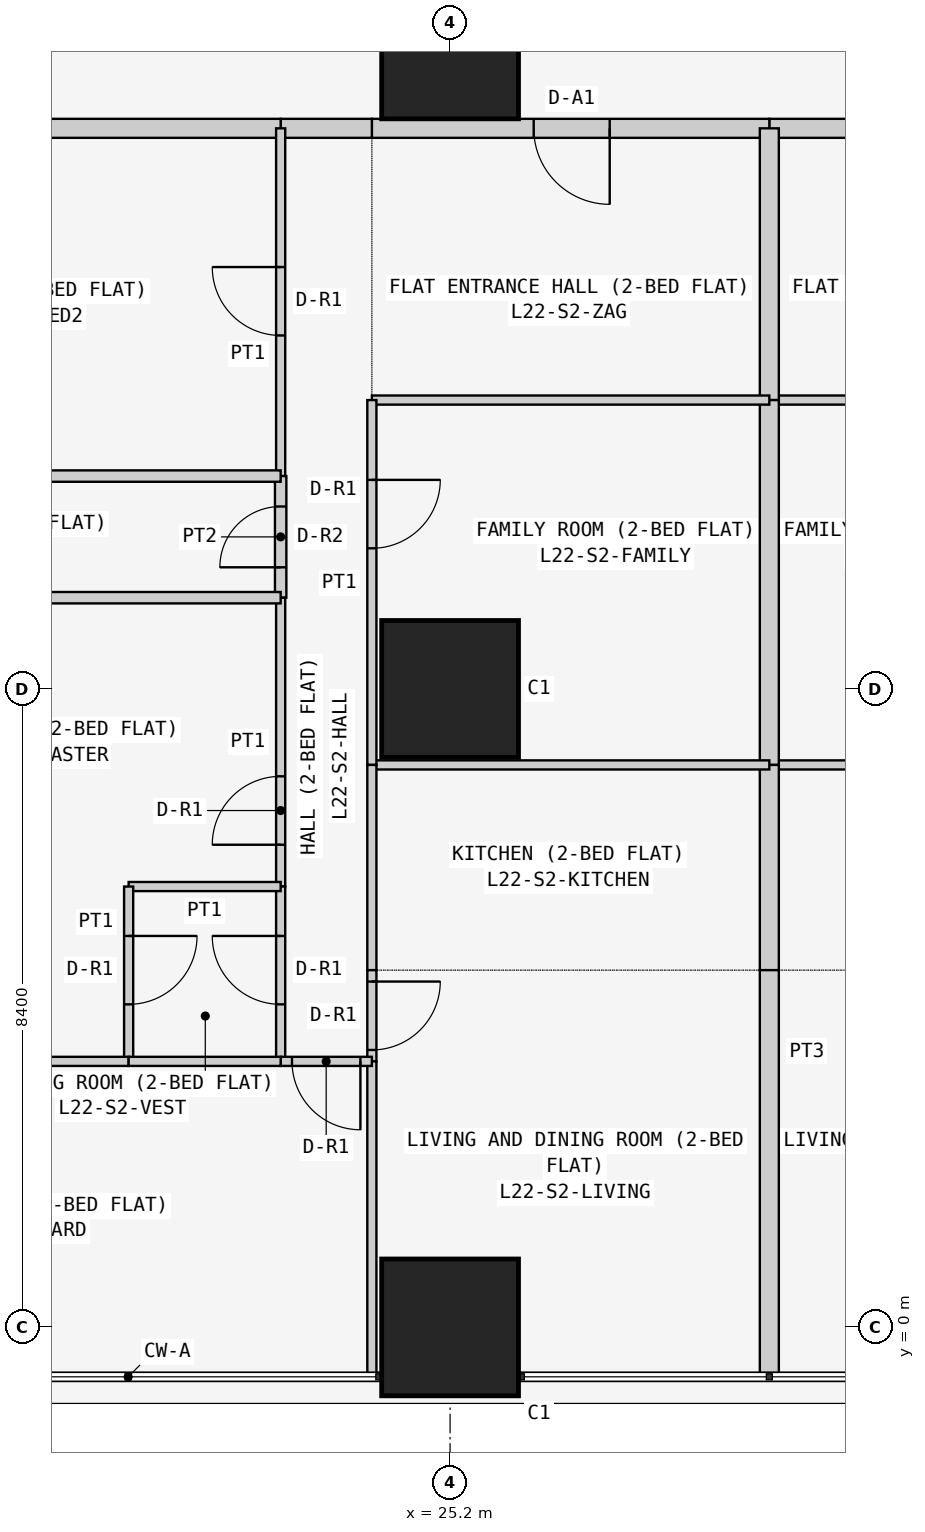
"""IFC4 building model, lengths in metres.
Left out: names, types, materials, properties, quantities, classifications, styles, units other than length and angle.
Written with IfcOpenShell. Run it as: python <this file> out.ifc"""

import sys

from ifc_helpers import new_model, si_unit, direction, frame, frame_2d, origin, origin_2d, place, context, subcontext, project, spatial, rectangle, extrude, element, fill, save


model = new_model("IFC4")
c1 = context("Model", 3, precision=1e-05, world=origin(), true_north=direction((0.0, 1.0)))
c2 = subcontext(c1, "Body", "Model", "MODEL_VIEW")
j1 = project(units=[si_unit("LENGTHUNIT", "METRE"), si_unit("PLANEANGLEUNIT", "RADIAN")], contexts=[c1])
p1 = place(None, origin())
s1 = spatial("IfcSite", under=j1, at=p1, CompositionType="ELEMENT")
p2 = place(p1, origin())
s2 = spatial("IfcBuilding", under=s1, at=p2, CompositionType="ELEMENT")
p3 = place(p2, frame((0.0, 0.0, 88.5)))
s3 = spatial("IfcBuildingStorey", under=s2, at=p3, CompositionType="ELEMENT", Elevation=88.5)
for number, where, z_axis, x_axis in (
    (1, (25.2, 0.0, 0.0), (0.0, 0.0, 1.0), (1.0, 0.0, 0.0)),
    (2, (25.2, 8.4, 0.0), (0.0, 0.0, 1.0), (1.0, 0.0, 0.0)),
    (3, (25.2, 16.8, 0.0), (0.0, 0.0, 1.0), (1.0, 0.0, 0.0)),
):
    element("IfcColumn", number, at=place(p3, frame(where, z_axis=z_axis, x_axis=x_axis)), inside=s3, PredefinedType="COLUMN", context=c2, shape_type="SweptSolid", body=[
        extrude(rectangle(XDim=1.8, YDim=1.8, at=origin_2d()), origin(), (0.0, 0.0, 1.0), 3.6),
    ])
p4 = place(p3, frame((34.629, 15.775, 0.0), z_axis=(0.0, 0.0, 1.0), x_axis=(-1.0, 0.0, 0.0)))
e4 = element("IfcWall", 4, at=p4, inside=s3, PredefinedType="PARTITIONING", context=c2, shape_type="SweptSolid", body=[
    extrude(rectangle(XDim=5.229, YDim=0.25, at=frame_2d((2.615, 0.0))), origin(), (0.0, 0.0, 1.0), 3.45),
])
p5 = place(p4, frame((2.129, 0.0, 0.0)))
e5 = element("IfcOpeningElement", 5, at=p5, cuts=e4, PredefinedType="OPENING", context=c2, shape_type="SweptSolid", body=[
    extrude(rectangle(XDim=1.0, YDim=2.1, at=frame_2d((0.5, 1.05))), frame((0.0, 0.135, 0.0), z_axis=(0.0, -1.0, 0.0), x_axis=(1.0, 0.0, 0.0)), (0.0, 0.0, 1.0), 0.27),
])
p6 = place(p3, frame((29.4, 15.775, 0.0), z_axis=(0.0, 0.0, 1.0), x_axis=(-1.0, 0.0, 0.0)))
e6 = element("IfcWall", 6, at=p6, inside=s3, PredefinedType="PARTITIONING", context=c2, shape_type="SweptSolid", body=[
    extrude(rectangle(XDim=5.229, YDim=0.25, at=frame_2d((2.615, 0.0))), origin(), (0.0, 0.0, 1.0), 3.45),
])
p7 = place(p6, frame((2.1, 0.0, 0.0)))
e7 = element("IfcOpeningElement", 7, at=p7, cuts=e6, PredefinedType="OPENING", context=c2, shape_type="SweptSolid", body=[
    extrude(rectangle(XDim=1.0, YDim=2.1, at=frame_2d((0.5, 1.05))), frame((0.0, 0.135, 0.0), z_axis=(0.0, -1.0, 0.0), x_axis=(1.0, 0.0, 0.0)), (0.0, 0.0, 1.0), 0.27),
])
p8 = place(p3, frame((24.171, 15.775, 0.0), z_axis=(0.0, 0.0, 1.0), x_axis=(-1.0, 0.0, 0.0)))
e8 = element("IfcWall", 8, at=p8, inside=s3, PredefinedType="PARTITIONING", context=c2, shape_type="SweptSolid", body=[
    extrude(rectangle(XDim=1.2, YDim=0.25, at=frame_2d((0.6, 0.0))), origin(), (0.0, 0.0, 1.0), 3.45),
])
p9 = place(p3, frame((22.971, 15.775, 0.0), z_axis=(0.0, 0.0, 1.0), x_axis=(-1.0, 0.0, 0.0)))
e9 = element("IfcWall", 9, at=p9, inside=s3, PredefinedType="PARTITIONING", context=c2, shape_type="SweptSolid", body=[
    extrude(rectangle(XDim=6.871, YDim=0.25, at=frame_2d((3.436, 0.0))), origin(), (0.0, 0.0, 1.0), 3.45),
])
p10 = place(p3, frame((29.4, 12.2, 0.0), z_axis=(0.0, 0.0, 1.0), x_axis=(1.0, 0.0, 0.0)))
e10 = element("IfcWall", 10, at=p10, inside=s3, PredefinedType="PARTITIONING", context=c2, shape_type="SweptSolid", body=[
    extrude(rectangle(XDim=5.229, YDim=0.12, at=frame_2d((2.615, 0.0))), origin(), (0.0, 0.0, 1.0), 3.45),
])
p11 = place(p3, frame((29.4, 15.775, 0.0), z_axis=(0.0, 0.0, 1.0), x_axis=(0.0, -1.0, 0.0)))
e11 = element("IfcWall", 11, at=p11, inside=s3, PredefinedType="PARTITIONING", context=c2, shape_type="SweptSolid", body=[
    extrude(rectangle(XDim=3.575, YDim=0.25, at=frame_2d((1.788, 0.0))), origin(), (0.0, 0.0, 1.0), 2.848),
])
p12 = place(p3, frame((29.4, 7.4, 0.0), z_axis=(0.0, 0.0, 1.0), x_axis=(1.0, 0.0, 0.0)))
e12 = element("IfcWall", 12, at=p12, inside=s3, PredefinedType="PARTITIONING", context=c2, shape_type="SweptSolid", body=[
    extrude(rectangle(XDim=5.229, YDim=0.12, at=frame_2d((2.615, 0.0))), origin(), (0.0, 0.0, 1.0), 3.45),
])
p13 = place(p3, frame((29.4, 12.2, 0.0), z_axis=(0.0, 0.0, 1.0), x_axis=(0.0, -1.0, 0.0)))
e13 = element("IfcWall", 13, at=p13, inside=s3, PredefinedType="PARTITIONING", context=c2, shape_type="SweptSolid", body=[
    extrude(rectangle(XDim=4.8, YDim=0.25, at=frame_2d((2.4, 0.0))), origin(), (0.0, 0.0, 1.0), 2.848),
])
p14 = place(p3, frame((29.4, 7.4, 0.0), z_axis=(0.0, 0.0, 1.0), x_axis=(0.0, -1.0, 0.0)))
e14 = element("IfcWall", 14, at=p14, inside=s3, PredefinedType="PARTITIONING", context=c2, shape_type="SweptSolid", body=[
    extrude(rectangle(XDim=2.7, YDim=0.25, at=frame_2d((1.35, 0.0))), origin(), (0.0, 0.0, 1.0), 2.848),
])
p15 = place(p3, frame((29.4, 4.7, 0.0), z_axis=(0.0, 0.0, 1.0), x_axis=(0.0, -1.0, 0.0)))
e15 = element("IfcWall", 15, at=p15, inside=s3, PredefinedType="PARTITIONING", context=c2, shape_type="SweptSolid", body=[
    extrude(rectangle(XDim=5.35, YDim=0.25, at=frame_2d((2.675, 0.0))), origin(), (0.0, 0.0, 1.0), 2.848),
])
for number, where, z_axis, x_axis in (
    (16, (29.4, 12.2, 0.0), (0.0, 0.0, 1.0), (-1.0, 0.0, 0.0)),
    (17, (29.4, 7.4, 0.0), (0.0, 0.0, 1.0), (-1.0, 0.0, 0.0)),
):
    element("IfcWall", number, at=place(p3, frame(where, z_axis=z_axis, x_axis=x_axis)), inside=s3, PredefinedType="PARTITIONING", context=c2, shape_type="SweptSolid", body=[
        extrude(rectangle(XDim=5.229, YDim=0.12, at=frame_2d((2.615, 0.0))), origin(), (0.0, 0.0, 1.0), 3.45),
    ])
p16 = place(p3, frame((24.171, 7.4, 0.0), z_axis=(0.0, 0.0, 1.0), x_axis=(0.0, 1.0, 0.0)))
e18 = element("IfcWall", 18, at=p16, inside=s3, PredefinedType="PARTITIONING", context=c2, shape_type="SweptSolid", body=[
    extrude(rectangle(XDim=4.8, YDim=0.12, at=frame_2d((2.4, 0.0))), origin(), (0.0, 0.0, 1.0), 3.45),
])
p17 = place(p16, frame((2.85, 0.0, 0.0)))
e19 = element("IfcOpeningElement", 19, at=p17, cuts=e18, PredefinedType="OPENING", context=c2, shape_type="SweptSolid", body=[
    extrude(rectangle(XDim=0.9, YDim=2.1, at=frame_2d((0.45, 1.05))), frame((0.0, 0.07, 0.0), z_axis=(0.0, -1.0, 0.0), x_axis=(1.0, 0.0, 0.0)), (0.0, 0.0, 1.0), 0.14),
])
p18 = place(p3, frame((24.171, 4.7, 0.0), z_axis=(0.0, 0.0, 1.0), x_axis=(0.0, 1.0, 0.0)))
e20 = element("IfcWall", 20, at=p18, inside=s3, PredefinedType="PARTITIONING", context=c2, shape_type="SweptSolid", body=[
    extrude(rectangle(XDim=2.7, YDim=0.12, at=frame_2d((1.35, 0.0))), origin(), (0.0, 0.0, 1.0), 3.45),
])
p19 = place(p3, frame((24.171, 3.5, 0.0), z_axis=(0.0, 0.0, 1.0), x_axis=(0.0, 1.0, 0.0)))
e21 = element("IfcWall", 21, at=p19, inside=s3, PredefinedType="PARTITIONING", context=c2, shape_type="SweptSolid", body=[
    extrude(rectangle(XDim=1.2, YDim=0.12, at=frame_2d((0.6, 0.0))), origin(), (0.0, 0.0, 1.0), 3.45),
])
p20 = place(p19, frame((0.15, 0.0, 0.0)))
e22 = element("IfcOpeningElement", 22, at=p20, cuts=e21, PredefinedType="OPENING", context=c2, shape_type="SweptSolid", body=[
    extrude(rectangle(XDim=0.9, YDim=2.1, at=frame_2d((0.45, 1.05))), frame((0.0, 0.07, 0.0), z_axis=(0.0, -1.0, 0.0), x_axis=(1.0, 0.0, 0.0)), (0.0, 0.0, 1.0), 0.14),
])
p21 = place(p3, frame((24.171, -0.65, 0.0), z_axis=(0.0, 0.0, 1.0), x_axis=(0.0, 1.0, 0.0)))
e23 = element("IfcWall", 23, at=p21, inside=s3, PredefinedType="PARTITIONING", context=c2, shape_type="SweptSolid", body=[
    extrude(rectangle(XDim=4.15, YDim=0.12, at=frame_2d((2.075, 0.0))), origin(), (0.0, 0.0, 1.0), 3.45),
])
p22 = place(p3, frame((22.971, 11.2, 0.0), z_axis=(0.0, 0.0, 1.0), x_axis=(0.0, 1.0, 0.0)))
e24 = element("IfcWall", 24, at=p22, inside=s3, PredefinedType="PARTITIONING", context=c2, shape_type="SweptSolid", body=[
    extrude(rectangle(XDim=4.575, YDim=0.12, at=frame_2d((2.288, 0.0))), origin(), (0.0, 0.0, 1.0), 3.45),
])
p23 = place(p22, frame((1.85, 0.0, 0.0)))
e25 = element("IfcOpeningElement", 25, at=p23, cuts=e24, PredefinedType="OPENING", context=c2, shape_type="SweptSolid", body=[
    extrude(rectangle(XDim=0.9, YDim=2.1, at=frame_2d((0.45, 1.05))), frame((0.0, 0.07, 0.0), z_axis=(0.0, -1.0, 0.0), x_axis=(1.0, 0.0, 0.0)), (0.0, 0.0, 1.0), 0.14),
])
p24 = place(p3, frame((22.971, 9.6, 0.0), z_axis=(0.0, 0.0, 1.0), x_axis=(0.0, 1.0, 0.0)))
e26 = element("IfcWall", 26, at=p24, inside=s3, PredefinedType="PARTITIONING", context=c2, shape_type="SweptSolid", body=[
    extrude(rectangle(XDim=1.6, YDim=0.15, at=frame_2d((0.8, 0.0))), origin(), (0.0, 0.0, 1.0), 3.45),
])
p25 = place(p24, frame((0.4, 0.0, 0.0)))
e27 = element("IfcOpeningElement", 27, at=p25, cuts=e26, PredefinedType="OPENING", context=c2, shape_type="SweptSolid", body=[
    extrude(rectangle(XDim=0.8, YDim=2.1, at=frame_2d((0.4, 1.05))), frame((0.0, 0.085, 0.0), z_axis=(0.0, -1.0, 0.0), x_axis=(1.0, 0.0, 0.0)), (0.0, 0.0, 1.0), 0.17),
])
p26 = place(p3, frame((22.971, 5.8, 0.0), z_axis=(0.0, 0.0, 1.0), x_axis=(0.0, 1.0, 0.0)))
e28 = element("IfcWall", 28, at=p26, inside=s3, PredefinedType="PARTITIONING", context=c2, shape_type="SweptSolid", body=[
    extrude(rectangle(XDim=3.8, YDim=0.12, at=frame_2d((1.9, 0.0))), origin(), (0.0, 0.0, 1.0), 3.45),
])
p27 = place(p26, frame((0.55, 0.0, 0.0)))
e29 = element("IfcOpeningElement", 29, at=p27, cuts=e28, PredefinedType="OPENING", context=c2, shape_type="SweptSolid", body=[
    extrude(rectangle(XDim=0.9, YDim=2.1, at=frame_2d((0.45, 1.05))), frame((0.0, 0.07, 0.0), z_axis=(0.0, -1.0, 0.0), x_axis=(1.0, 0.0, 0.0)), (0.0, 0.0, 1.0), 0.14),
])
p28 = place(p3, frame((22.971, 3.5, 0.0), z_axis=(0.0, 0.0, 1.0), x_axis=(0.0, 1.0, 0.0)))
e30 = element("IfcWall", 30, at=p28, inside=s3, PredefinedType="PARTITIONING", context=c2, shape_type="SweptSolid", body=[
    extrude(rectangle(XDim=2.3, YDim=0.12, at=frame_2d((1.15, 0.0))), origin(), (0.0, 0.0, 1.0), 3.45),
])
p29 = place(p28, frame((0.75, 0.0, 0.0)))
e31 = element("IfcOpeningElement", 31, at=p29, cuts=e30, PredefinedType="OPENING", context=c2, shape_type="SweptSolid", body=[
    extrude(rectangle(XDim=0.9, YDim=2.1, at=frame_2d((0.45, 1.05))), frame((0.0, 0.07, 0.0), z_axis=(0.0, -1.0, 0.0), x_axis=(1.0, 0.0, 0.0)), (0.0, 0.0, 1.0), 0.14),
])
p30 = place(p3, frame((24.171, 3.5, 0.0), z_axis=(0.0, 0.0, 1.0), x_axis=(-1.0, 0.0, 0.0)))
e32 = element("IfcWall", 32, at=p30, inside=s3, PredefinedType="PARTITIONING", context=c2, shape_type="SweptSolid", body=[
    extrude(rectangle(XDim=1.2, YDim=0.12, at=frame_2d((0.6, 0.0))), origin(), (0.0, 0.0, 1.0), 3.45),
])
p31 = place(p30, frame((0.151, 0.0, 0.0)))
e33 = element("IfcOpeningElement", 33, at=p31, cuts=e32, PredefinedType="OPENING", context=c2, shape_type="SweptSolid", body=[
    extrude(rectangle(XDim=0.9, YDim=2.1, at=frame_2d((0.45, 1.05))), frame((0.0, 0.07, 0.0), z_axis=(0.0, -1.0, 0.0), x_axis=(1.0, 0.0, 0.0)), (0.0, 0.0, 1.0), 0.14),
])
for number, where, z_axis, x_axis in (
    (34, (22.971, 11.2, 0.0), (0.0, 0.0, 1.0), (-1.0, 0.0, 0.0)),
    (35, (22.971, 9.6, 0.0), (0.0, 0.0, 1.0), (-1.0, 0.0, 0.0)),
):
    element("IfcWall", number, at=place(p3, frame(where, z_axis=z_axis, x_axis=x_axis)), inside=s3, PredefinedType="PARTITIONING", context=c2, shape_type="SweptSolid", body=[
        extrude(rectangle(XDim=6.871, YDim=0.15, at=frame_2d((3.436, 0.0))), origin(), (0.0, 0.0, 1.0), 3.45),
    ])
p32 = place(p3, frame((22.971, 5.8, 0.0), z_axis=(0.0, 0.0, 1.0), x_axis=(-1.0, 0.0, 0.0)))
e36 = element("IfcWall", 36, at=p32, inside=s3, PredefinedType="PARTITIONING", context=c2, shape_type="SweptSolid", body=[
    extrude(rectangle(XDim=2.0, YDim=0.12, at=frame_2d((1.0, 0.0))), origin(), (0.0, 0.0, 1.0), 3.45),
])
p33 = place(p3, frame((20.971, 5.8, 0.0), z_axis=(0.0, 0.0, 1.0), x_axis=(0.0, -1.0, 0.0)))
e37 = element("IfcWall", 37, at=p33, inside=s3, PredefinedType="PARTITIONING", context=c2, shape_type="SweptSolid", body=[
    extrude(rectangle(XDim=2.3, YDim=0.12, at=frame_2d((1.15, 0.0))), origin(), (0.0, 0.0, 1.0), 2.848),
])
p34 = place(p33, frame((0.65, 0.0, 0.0)))
e38 = element("IfcOpeningElement", 38, at=p34, cuts=e37, PredefinedType="OPENING", context=c2, shape_type="SweptSolid", body=[
    extrude(rectangle(XDim=0.9, YDim=2.1, at=frame_2d((0.45, 1.05))), frame((0.0, 0.07, 0.0), z_axis=(0.0, -1.0, 0.0), x_axis=(1.0, 0.0, 0.0)), (0.0, 0.0, 1.0), 0.14),
])
p35 = place(p3, frame((20.971, 3.5, 0.0), z_axis=(0.0, 0.0, 1.0), x_axis=(-1.0, 0.0, 0.0)))
e39 = element("IfcWall", 39, at=p35, inside=s3, PredefinedType="PARTITIONING", context=c2, shape_type="SweptSolid", body=[
    extrude(rectangle(XDim=4.871, YDim=0.12, at=frame_2d((2.436, 0.0))), origin(), (0.0, 0.0, 1.0), 3.45),
])
p36 = place(p3, frame((22.971, 3.5, 0.0), z_axis=(0.0, 0.0, 1.0), x_axis=(-1.0, 0.0, 0.0)))
e40 = element("IfcWall", 40, at=p36, inside=s3, PredefinedType="PARTITIONING", context=c2, shape_type="SweptSolid", body=[
    extrude(rectangle(XDim=2.0, YDim=0.12, at=frame_2d((1.0, 0.0))), origin(), (0.0, 0.0, 1.0), 3.45),
])
p37 = place(p7, origin())
e41 = element("IfcDoor", 41, at=p37, inside=s3, OperationType="SINGLE_SWING_LEFT", PredefinedType="DOOR", context=c2, shape_type="SweptSolid", body=[
    extrude(rectangle(XDim=1.0, YDim=2.1, at=frame_2d((0.5, 1.05))), frame((0.0, 0.025, 0.0), z_axis=(0.0, -1.0, 0.0), x_axis=(1.0, 0.0, 0.0)), (0.0, 0.0, 1.0), 0.05),
])
fill(e7, e41)
p38 = place(p17, frame((0.9, 0.0, 0.0), z_axis=(0.0, 0.0, 1.0), x_axis=(-1.0, 0.0, 0.0)))
e42 = element("IfcDoor", 42, at=p38, inside=s3, OperationType="SINGLE_SWING_LEFT", PredefinedType="DOOR", context=c2, shape_type="SweptSolid", body=[
    extrude(rectangle(XDim=0.9, YDim=2.1, at=frame_2d((0.45, 1.05))), frame((0.0, 0.025, 0.0), z_axis=(0.0, -1.0, 0.0), x_axis=(1.0, 0.0, 0.0)), (0.0, 0.0, 1.0), 0.05),
])
fill(e19, e42)
p39 = place(p20, frame((0.9, 0.0, 0.0), z_axis=(0.0, 0.0, 1.0), x_axis=(-1.0, 0.0, 0.0)))
e43 = element("IfcDoor", 43, at=p39, inside=s3, OperationType="SINGLE_SWING_LEFT", PredefinedType="DOOR", context=c2, shape_type="SweptSolid", body=[
    extrude(rectangle(XDim=0.9, YDim=2.1, at=frame_2d((0.45, 1.05))), frame((0.0, 0.025, 0.0), z_axis=(0.0, -1.0, 0.0), x_axis=(1.0, 0.0, 0.0)), (0.0, 0.0, 1.0), 0.05),
])
fill(e22, e43)
p40 = place(p23, origin())
e44 = element("IfcDoor", 44, at=p40, inside=s3, OperationType="SINGLE_SWING_RIGHT", PredefinedType="DOOR", context=c2, shape_type="SweptSolid", body=[
    extrude(rectangle(XDim=0.9, YDim=2.1, at=frame_2d((0.45, 1.05))), frame((0.0, 0.025, 0.0), z_axis=(0.0, -1.0, 0.0), x_axis=(1.0, 0.0, 0.0)), (0.0, 0.0, 1.0), 0.05),
])
fill(e25, e44)
p41 = place(p25, origin())
e45 = element("IfcDoor", 45, at=p41, inside=s3, OperationType="SINGLE_SWING_LEFT", PredefinedType="DOOR", context=c2, shape_type="SweptSolid", body=[
    extrude(rectangle(XDim=0.8, YDim=2.1, at=frame_2d((0.4, 1.05))), frame((0.0, 0.025, 0.0), z_axis=(0.0, -1.0, 0.0), x_axis=(1.0, 0.0, 0.0)), (0.0, 0.0, 1.0), 0.05),
])
fill(e27, e45)
p42 = place(p27, origin())
e46 = element("IfcDoor", 46, at=p42, inside=s3, OperationType="SINGLE_SWING_LEFT", PredefinedType="DOOR", context=c2, shape_type="SweptSolid", body=[
    extrude(rectangle(XDim=0.9, YDim=2.1, at=frame_2d((0.45, 1.05))), frame((0.0, 0.025, 0.0), z_axis=(0.0, -1.0, 0.0), x_axis=(1.0, 0.0, 0.0)), (0.0, 0.0, 1.0), 0.05),
])
fill(e29, e46)
p43 = place(p29, origin())
e47 = element("IfcDoor", 47, at=p43, inside=s3, OperationType="SINGLE_SWING_RIGHT", PredefinedType="DOOR", context=c2, shape_type="SweptSolid", body=[
    extrude(rectangle(XDim=0.9, YDim=2.1, at=frame_2d((0.45, 1.05))), frame((0.0, 0.025, 0.0), z_axis=(0.0, -1.0, 0.0), x_axis=(1.0, 0.0, 0.0)), (0.0, 0.0, 1.0), 0.05),
])
fill(e31, e47)
p44 = place(p34, origin())
e48 = element("IfcDoor", 48, at=p44, inside=s3, OperationType="SINGLE_SWING_LEFT", PredefinedType="DOOR", context=c2, shape_type="SweptSolid", body=[
    extrude(rectangle(XDim=0.9, YDim=2.1, at=frame_2d((0.45, 1.05))), frame((0.0, 0.025, 0.0), z_axis=(0.0, -1.0, 0.0), x_axis=(1.0, 0.0, 0.0)), (0.0, 0.0, 1.0), 0.05),
])
fill(e38, e48)
p45 = place(p31, origin())
e49 = element("IfcDoor", 49, at=p45, inside=s3, OperationType="SINGLE_SWING_LEFT", PredefinedType="DOOR", context=c2, shape_type="SweptSolid", body=[
    extrude(rectangle(XDim=0.9, YDim=2.1, at=frame_2d((0.45, 1.05))), frame((0.0, 0.025, 0.0), z_axis=(0.0, -1.0, 0.0), x_axis=(1.0, 0.0, 0.0)), (0.0, 0.0, 1.0), 0.05),
])
fill(e33, e49)
save(model, sys.argv[1])
